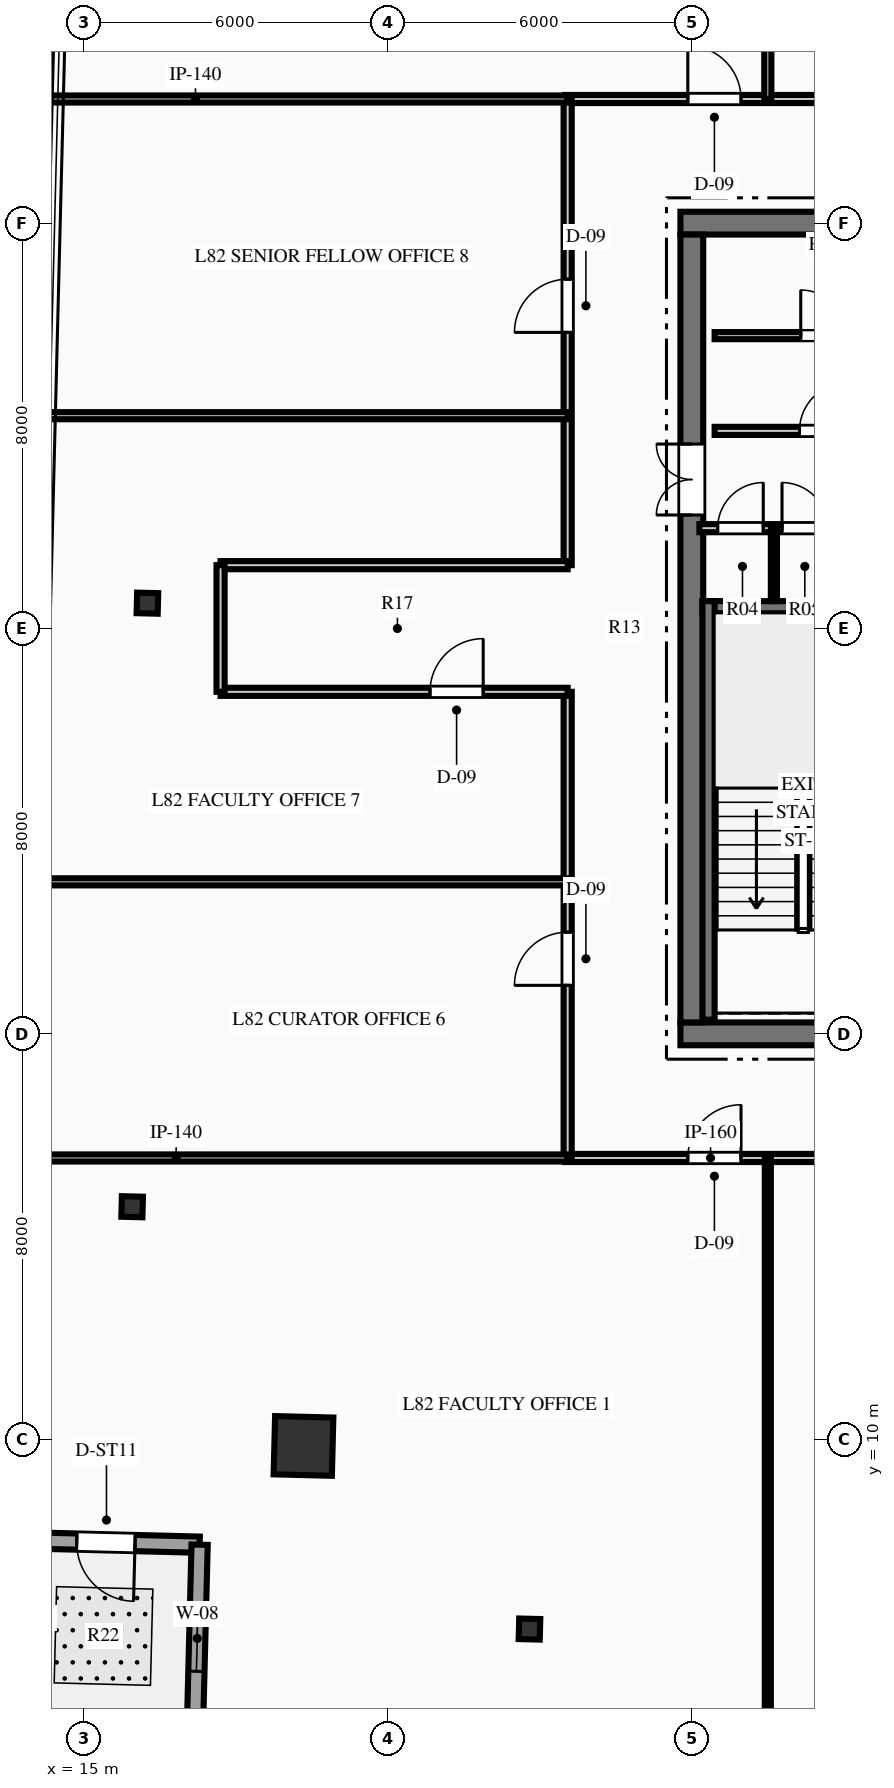
"""IFC4 building model, lengths in metres.
Left out: names, types, materials, properties, quantities, classifications, styles, units other than length and angle.
Written with IfcOpenShell. Run it as: python <this file> out.ifc"""

import sys

from ifc_helpers import new_model, si_unit, direction, frame, frame_2d, origin, origin_2d, place, context, subcontext, project, spatial, rectangle, hollow_rectangle, i_section, extrude, element, fill, save


model = new_model("IFC4")
c1 = context("Model", 3, precision=1e-05, world=origin(), true_north=direction((0.0, 1.0)))
c2 = subcontext(c1, "Body", "Model", "MODEL_VIEW")
j1 = project(units=[si_unit("LENGTHUNIT", "METRE"), si_unit("PLANEANGLEUNIT", "RADIAN")], contexts=[c1])
p1 = place(None, origin())
s1 = spatial("IfcSite", under=j1, at=p1, CompositionType="ELEMENT")
p2 = place(p1, origin())
s2 = spatial("IfcBuilding", under=s1, at=p2, CompositionType="ELEMENT")
p3 = place(p2, frame((0.0, 0.0, 325.2)))
s3 = spatial("IfcBuildingStorey", under=s2, at=p3, CompositionType="ELEMENT", Elevation=325.2)
p4 = place(p3, frame((26.775, 18.0, 0.0), z_axis=(0.0, 0.0, 1.0), x_axis=(1.0, 0.0, 0.0)))
e1 = element("IfcWall", 1, at=p4, inside=s3, PredefinedType="SHEAR", context=c2, shape_type="SweptSolid", body=[
    extrude(rectangle(XDim=18.45, YDim=0.45, at=frame_2d((9.225, 0.0))), origin(), (0.0, 0.0, 1.0), 3.75),
])
p5 = place(p4, frame((7.325, 0.0, 0.0)))
e2 = element("IfcOpeningElement", 2, at=p5, cuts=e1, PredefinedType="OPENING", context=c2, shape_type="SweptSolid", body=[
    extrude(rectangle(XDim=1.1, YDim=2.15, at=frame_2d((0.55, 1.075))), frame((0.0, 0.235, 0.0), z_axis=(0.0, -1.0, 0.0), x_axis=(1.0, 0.0, 0.0)), (0.0, 0.0, 1.0), 0.47),
])
p6 = place(p4, frame((10.025, 0.0, 0.0)))
e3 = element("IfcOpeningElement", 3, at=p6, cuts=e1, PredefinedType="OPENING", context=c2, shape_type="SweptSolid", body=[
    extrude(rectangle(XDim=1.1, YDim=2.15, at=frame_2d((0.55, 1.075))), frame((0.0, 0.235, 0.0), z_axis=(0.0, -1.0, 0.0), x_axis=(1.0, 0.0, 0.0)), (0.0, 0.0, 1.0), 0.47),
])
p7 = place(p3, frame((26.775, 34.0, 0.0), z_axis=(0.0, 0.0, 1.0), x_axis=(1.0, 0.0, 0.0)))
e4 = element("IfcWall", 4, at=p7, inside=s3, PredefinedType="SHEAR", context=c2, shape_type="SweptSolid", body=[
    extrude(rectangle(XDim=18.45, YDim=0.45, at=frame_2d((9.225, 0.0))), origin(), (0.0, 0.0, 1.0), 3.75),
])
p8 = place(p3, frame((27.0, 18.225, 0.0), z_axis=(0.0, 0.0, 1.0), x_axis=(0.0, 1.0, 0.0)))
e5 = element("IfcWall", 5, at=p8, inside=s3, PredefinedType="SHEAR", context=c2, shape_type="SweptSolid", body=[
    extrude(rectangle(XDim=15.55, YDim=0.45, at=frame_2d((7.775, 0.0))), origin(), (0.0, 0.0, 1.0), 3.75),
])
p9 = place(p8, frame((10.015, 0.0, 0.0)))
e6 = element("IfcOpeningElement", 6, at=p9, cuts=e5, PredefinedType="OPENING", context=c2, shape_type="SweptSolid", body=[
    extrude(rectangle(XDim=1.4, YDim=2.2, at=frame_2d((0.7, 1.1))), frame((0.0, 0.235, 0.0), z_axis=(0.0, -1.0, 0.0), x_axis=(1.0, 0.0, 0.0)), (0.0, 0.0, 1.0), 0.47),
])
p10 = place(p3, frame((27.21, 26.42, 0.0), z_axis=(0.0, 0.0, 1.0), x_axis=(1.0, 0.0, 0.0)))
e7 = element("IfcWall", 7, at=p10, inside=s3, PredefinedType="SHEAR", context=c2, shape_type="SweptSolid", body=[
    extrude(rectangle(XDim=3.98, YDim=0.24, at=frame_2d((1.99, 0.0))), origin(), (0.0, 0.0, 1.0), 3.75),
])
p11 = place(p3, frame((27.33, 18.28, 0.0), z_axis=(0.0, 0.0, 1.0), x_axis=(0.0, 1.0, 0.0)))
e8 = element("IfcWall", 8, at=p11, inside=s3, PredefinedType="SHEAR", context=c2, shape_type="SweptSolid", body=[
    extrude(rectangle(XDim=8.26, YDim=0.24, at=frame_2d((4.13, 0.0))), origin(), (0.0, 0.0, 1.0), 3.75),
])
p12 = place(p3, frame((19.336, 9.866, 0.0), z_axis=(0.0, 0.0, 1.0), x_axis=(0.025304572866, 0.999679788028, 0.0)))
e9 = element("IfcColumn", 9, at=p12, inside=s3, PredefinedType="COLUMN", context=c2, shape_type="SweptSolid", body=[
    extrude(hollow_rectangle(XDim=1.15, YDim=1.15, WallThickness=0.05, at=origin_2d()), origin(), (0.0, 0.0, 1.0), 3.75),
])
for number, where, z_axis, x_axis in (
    (10, (16.256, 26.5, 0.0), (0.0, 0.0, 1.0), (0.025, 1.0, 0.0)),
    (11, (15.955, 14.588, 0.0), (0.0, 0.0, 1.0), (0.025, 1.0, 0.0)),
    (12, (23.796, 6.252, 0.0), (0.0, 0.0, 1.0), (0.025, 1.0, 0.0)),
):
    element("IfcColumn", number, at=place(p3, frame(where, z_axis=z_axis, x_axis=x_axis)), inside=s3, PredefinedType="COLUMN", context=c2, shape_type="SweptSolid", body=[
        extrude(i_section(OverallWidth=0.406, OverallDepth=0.416, WebThickness=0.03, FlangeThickness=0.048, at=origin_2d()), origin(), (0.0, 0.0, 1.0), 3.75),
    ])
p13 = place(p3, frame((17.286, 7.918, 0.0), z_axis=(0.0, 0.0, 1.0), x_axis=(-0.999678931284, 0.025338396674, 0.0)))
e13 = element("IfcWall", 13, at=p13, inside=s3, PredefinedType="STANDARD", context=c2, shape_type="SweptSolid", body=[
    extrude(rectangle(XDim=3.7, YDim=0.32, at=frame_2d((1.85, 0.0))), origin(), (0.0, 0.0, 1.0), 3.49),
])
p14 = place(p13, frame((1.275, 0.0, 0.0)))
e14 = element("IfcOpeningElement", 14, at=p14, cuts=e13, PredefinedType="OPENING", context=c2, shape_type="SweptSolid", body=[
    extrude(rectangle(XDim=1.15, YDim=2.2, at=frame_2d((0.575, 1.1))), frame((0.0, 0.17, 0.0), z_axis=(0.0, -1.0, 0.0), x_axis=(1.0, 0.0, 0.0)), (0.0, 0.0, 1.0), 0.34),
])
p15 = place(p3, frame((17.193, 4.219, 0.0), z_axis=(0.0, 0.0, 1.0), x_axis=(0.025272453466, 0.99968060054, 0.0)))
e15 = element("IfcWall", 15, at=p15, inside=s3, PredefinedType="STANDARD", context=c2, shape_type="SweptSolid", body=[
    extrude(rectangle(XDim=3.7, YDim=0.32, at=frame_2d((1.85, 0.0))), origin(), (0.0, 0.0, 1.0), 3.49),
])
p16 = place(p15, frame((1.2, 0.0, 0.85)))
e16 = element("IfcOpeningElement", 16, at=p16, cuts=e15, PredefinedType="OPENING", context=c2, shape_type="SweptSolid", body=[
    extrude(rectangle(XDim=1.3, YDim=1.9, at=frame_2d((0.65, 0.95))), frame((0.0, 0.17, 0.0), z_axis=(0.0, -1.0, 0.0), x_axis=(1.0, 0.0, 0.0)), (0.0, 0.0, 1.0), 0.34),
])
p17 = place(p3, frame((27.15, 27.98, 0.0), z_axis=(0.0, 0.0, 1.0), x_axis=(1.0, 0.0, 0.0)))
e17 = element("IfcWall", 17, at=p17, inside=s3, PredefinedType="PARTITIONING", context=c2, shape_type="SweptSolid", body=[
    extrude(rectangle(XDim=4.05, YDim=0.16, at=frame_2d((2.025, 0.0))), origin(), (0.0, 0.0, 1.0), 3.49),
])
p18 = place(p17, frame((0.36, 0.0, 0.0)))
e18 = element("IfcOpeningElement", 18, at=p18, cuts=e17, PredefinedType="OPENING", context=c2, shape_type="SweptSolid", body=[
    extrude(rectangle(XDim=0.9, YDim=2.15, at=frame_2d((0.45, 1.075))), frame((0.0, 0.09, 0.0), z_axis=(0.0, -1.0, 0.0), x_axis=(1.0, 0.0, 0.0)), (0.0, 0.0, 1.0), 0.18),
])
p19 = place(p17, frame((1.63, 0.0, 0.0)))
e19 = element("IfcOpeningElement", 19, at=p19, cuts=e17, PredefinedType="OPENING", context=c2, shape_type="SweptSolid", body=[
    extrude(rectangle(XDim=0.9, YDim=2.15, at=frame_2d((0.45, 1.075))), frame((0.0, 0.09, 0.0), z_axis=(0.0, -1.0, 0.0), x_axis=(1.0, 0.0, 0.0)), (0.0, 0.0, 1.0), 0.18),
])
p20 = place(p17, frame((2.788, 0.0, 0.0)))
e20 = element("IfcOpeningElement", 20, at=p20, cuts=e17, PredefinedType="OPENING", context=c2, shape_type="SweptSolid", body=[
    extrude(rectangle(XDim=0.9, YDim=2.15, at=frame_2d((0.45, 1.075))), frame((0.0, 0.09, 0.0), z_axis=(0.0, -1.0, 0.0), x_axis=(1.0, 0.0, 0.0)), (0.0, 0.0, 1.0), 0.18),
])
p21 = place(p3, frame((28.62, 26.54, 0.0), z_axis=(0.0, 0.0, 1.0), x_axis=(0.0, 1.0, 0.0)))
e21 = element("IfcWall", 21, at=p21, inside=s3, PredefinedType="PARTITIONING", context=c2, shape_type="SweptSolid", body=[
    extrude(rectangle(XDim=1.44, YDim=0.12, at=frame_2d((0.72, 0.0))), origin(), (0.0, 0.0, 1.0), 3.49),
])
p22 = place(p3, frame((27.45, 29.9, 0.0), z_axis=(0.0, 0.0, 1.0), x_axis=(1.0, 0.0, 0.0)))
e22 = element("IfcWall", 22, at=p22, inside=s3, PredefinedType="PARTITIONING", context=c2, shape_type="SweptSolid", body=[
    extrude(rectangle(XDim=4.43, YDim=0.16, at=frame_2d((2.215, 0.0))), origin(), (0.0, 0.0, 1.0), 3.49),
])
p23 = place(p22, frame((1.675, 0.0, 0.0)))
e23 = element("IfcOpeningElement", 23, at=p23, cuts=e22, PredefinedType="OPENING", context=c2, shape_type="SweptSolid", body=[
    extrude(rectangle(XDim=0.95, YDim=2.15, at=frame_2d((0.475, 1.075))), frame((0.0, 0.09, 0.0), z_axis=(0.0, -1.0, 0.0), x_axis=(1.0, 0.0, 0.0)), (0.0, 0.0, 1.0), 0.18),
])
p24 = place(p3, frame((27.45, 31.78, 0.0), z_axis=(0.0, 0.0, 1.0), x_axis=(1.0, 0.0, 0.0)))
e24 = element("IfcWall", 24, at=p24, inside=s3, PredefinedType="PARTITIONING", context=c2, shape_type="SweptSolid", body=[
    extrude(rectangle(XDim=4.35, YDim=0.14, at=frame_2d((2.175, 0.0))), origin(), (0.0, 0.0, 1.0), 3.49),
])
p25 = place(p24, frame((1.7, 0.0, 0.0)))
e25 = element("IfcOpeningElement", 25, at=p25, cuts=e24, PredefinedType="OPENING", context=c2, shape_type="SweptSolid", body=[
    extrude(rectangle(XDim=0.9, YDim=2.15, at=frame_2d((0.45, 1.075))), frame((0.0, 0.08, 0.0), z_axis=(0.0, -1.0, 0.0), x_axis=(1.0, 0.0, 0.0)), (0.0, 0.0, 1.0), 0.16),
])
p26 = place(p3, frame((24.5, 15.55, 0.0), z_axis=(0.0, 0.0, 1.0), x_axis=(1.0, 0.0, 0.0)))
e26 = element("IfcWall", 26, at=p26, inside=s3, PredefinedType="PARTITIONING", context=c2, shape_type="SweptSolid", body=[
    extrude(rectangle(XDim=10.25, YDim=0.16, at=frame_2d((5.125, 0.0))), origin(), (0.0, 0.0, 1.0), 3.49),
])
p27 = place(p26, frame((2.421, 0.0, 0.0)))
e27 = element("IfcOpeningElement", 27, at=p27, cuts=e26, PredefinedType="OPENING", context=c2, shape_type="SweptSolid", body=[
    extrude(rectangle(XDim=1.05, YDim=2.15, at=frame_2d((0.525, 1.075))), frame((0.0, 0.09, 0.0), z_axis=(0.0, -1.0, 0.0), x_axis=(1.0, 0.0, 0.0)), (0.0, 0.0, 1.0), 0.18),
])
p28 = place(p26, frame((5.249, 0.0, 0.0)))
e28 = element("IfcOpeningElement", 28, at=p28, cuts=e26, PredefinedType="OPENING", context=c2, shape_type="SweptSolid", body=[
    extrude(rectangle(XDim=1.05, YDim=2.15, at=frame_2d((0.525, 1.075))), frame((0.0, 0.09, 0.0), z_axis=(0.0, -1.0, 0.0), x_axis=(1.0, 0.0, 0.0)), (0.0, 0.0, 1.0), 0.18),
])
p29 = place(p3, frame((24.5, 36.45, 0.0), z_axis=(0.0, 0.0, 1.0), x_axis=(1.0, 0.0, 0.0)))
e29 = element("IfcWall", 29, at=p29, inside=s3, PredefinedType="PARTITIONING", context=c2, shape_type="SweptSolid", body=[
    extrude(rectangle(XDim=10.25, YDim=0.16, at=frame_2d((5.125, 0.0))), origin(), (0.0, 0.0, 1.0), 3.49),
])
p30 = place(p29, frame((2.421, 0.0, 0.0)))
e30 = element("IfcOpeningElement", 30, at=p30, cuts=e29, PredefinedType="OPENING", context=c2, shape_type="SweptSolid", body=[
    extrude(rectangle(XDim=1.05, YDim=2.15, at=frame_2d((0.525, 1.075))), frame((0.0, 0.09, 0.0), z_axis=(0.0, -1.0, 0.0), x_axis=(1.0, 0.0, 0.0)), (0.0, 0.0, 1.0), 0.18),
])
p31 = place(p29, frame((5.249, 0.0, 0.0)))
e31 = element("IfcOpeningElement", 31, at=p31, cuts=e29, PredefinedType="OPENING", context=c2, shape_type="SweptSolid", body=[
    extrude(rectangle(XDim=1.05, YDim=2.15, at=frame_2d((0.525, 1.075))), frame((0.0, 0.09, 0.0), z_axis=(0.0, -1.0, 0.0), x_axis=(1.0, 0.0, 0.0)), (0.0, 0.0, 1.0), 0.18),
])
p32 = place(p3, frame((24.55, 15.55, 0.0), z_axis=(0.0, 0.0, 1.0), x_axis=(0.0, 1.0, 0.0)))
e32 = element("IfcWall", 32, at=p32, inside=s3, PredefinedType="PARTITIONING", context=c2, shape_type="SweptSolid", body=[
    extrude(rectangle(XDim=9.2, YDim=0.16, at=frame_2d((4.6, 0.0))), origin(), (0.0, 0.0, 1.0), 3.49),
])
p33 = place(p32, frame((3.407, 0.0, 0.0)))
e33 = element("IfcOpeningElement", 33, at=p33, cuts=e32, PredefinedType="OPENING", context=c2, shape_type="SweptSolid", body=[
    extrude(rectangle(XDim=1.05, YDim=2.15, at=frame_2d((0.525, 1.075))), frame((0.0, 0.09, 0.0), z_axis=(0.0, -1.0, 0.0), x_axis=(1.0, 0.0, 0.0)), (0.0, 0.0, 1.0), 0.18),
])
p34 = place(p3, frame((24.55, 27.25, 0.0), z_axis=(0.0, 0.0, 1.0), x_axis=(0.0, 1.0, 0.0)))
e34 = element("IfcWall", 34, at=p34, inside=s3, PredefinedType="PARTITIONING", context=c2, shape_type="SweptSolid", body=[
    extrude(rectangle(XDim=9.2, YDim=0.16, at=frame_2d((4.6, 0.0))), origin(), (0.0, 0.0, 1.0), 3.49),
])
p35 = place(p34, frame((4.594, 0.0, 0.0)))
e35 = element("IfcOpeningElement", 35, at=p35, cuts=e34, PredefinedType="OPENING", context=c2, shape_type="SweptSolid", body=[
    extrude(rectangle(XDim=1.05, YDim=2.15, at=frame_2d((0.525, 1.075))), frame((0.0, 0.09, 0.0), z_axis=(0.0, -1.0, 0.0), x_axis=(1.0, 0.0, 0.0)), (0.0, 0.0, 1.0), 0.18),
])
p36 = place(p3, frame((17.7, 24.75, 0.0), z_axis=(0.0, 0.0, 1.0), x_axis=(1.0, 0.0, 0.0)))
e36 = element("IfcWall", 36, at=p36, inside=s3, PredefinedType="PARTITIONING", context=c2, shape_type="SweptSolid", body=[
    extrude(rectangle(XDim=6.85, YDim=0.16, at=frame_2d((3.425, 0.0))), origin(), (0.0, 0.0, 1.0), 3.49),
])
p37 = place(p36, frame((4.133, 0.0, 0.0)))
e37 = element("IfcOpeningElement", 37, at=p37, cuts=e36, PredefinedType="OPENING", context=c2, shape_type="SweptSolid", body=[
    extrude(rectangle(XDim=1.05, YDim=2.15, at=frame_2d((0.525, 1.075))), frame((0.0, 0.09, 0.0), z_axis=(0.0, -1.0, 0.0), x_axis=(1.0, 0.0, 0.0)), (0.0, 0.0, 1.0), 0.18),
])
p38 = place(p3, frame((17.7, 27.25, 0.0), z_axis=(0.0, 0.0, 1.0), x_axis=(1.0, 0.0, 0.0)))
e38 = element("IfcWall", 38, at=p38, inside=s3, PredefinedType="PARTITIONING", context=c2, shape_type="SweptSolid", body=[
    extrude(rectangle(XDim=6.85, YDim=0.16, at=frame_2d((3.425, 0.0))), origin(), (0.0, 0.0, 1.0), 3.49),
])
p39 = place(p3, frame((17.7, 24.75, 0.0), z_axis=(0.0, 0.0, 1.0), x_axis=(0.0, 1.0, 0.0)))
e39 = element("IfcWall", 39, at=p39, inside=s3, PredefinedType="PARTITIONING", context=c2, shape_type="SweptSolid", body=[
    extrude(rectangle(XDim=2.5, YDim=0.16, at=frame_2d((1.25, 0.0))), origin(), (0.0, 0.0, 1.0), 3.49),
])
p40 = place(p3, frame((13.818, 15.55, 0.0), z_axis=(0.0, 0.0, 1.0), x_axis=(1.0, 0.0, 0.0)))
e40 = element("IfcWall", 40, at=p40, inside=s3, PredefinedType="PARTITIONING", context=c2, shape_type="SweptSolid", body=[
    extrude(rectangle(XDim=10.732, YDim=0.14, at=frame_2d((5.366, 0.0))), origin(), (0.0, 0.0, 1.0), 2.868),
])
p41 = place(p3, frame((14.347, 36.45, 0.0), z_axis=(0.0, 0.0, 1.0), x_axis=(1.0, 0.0, 0.0)))
e41 = element("IfcWall", 41, at=p41, inside=s3, PredefinedType="PARTITIONING", context=c2, shape_type="SweptSolid", body=[
    extrude(rectangle(XDim=10.203, YDim=0.14, at=frame_2d((5.101, 0.0))), origin(), (0.0, 0.0, 1.0), 2.868),
])
p42 = place(p3, frame((28.5, 3.973, 0.0), z_axis=(0.0, 0.0, 1.0), x_axis=(0.0, 1.0, 0.0)))
e42 = element("IfcWall", 42, at=p42, inside=s3, PredefinedType="PARTITIONING", context=c2, shape_type="SweptSolid", body=[
    extrude(rectangle(XDim=11.577, YDim=0.12, at=frame_2d((5.789, 0.0))), origin(), (0.0, 0.0, 1.0), 3.49),
])
p43 = place(p3, frame((28.5, 36.45, 0.0), z_axis=(0.0, 0.0, 1.0), x_axis=(0.0, 1.0, 0.0)))
e43 = element("IfcWall", 43, at=p43, inside=s3, PredefinedType="PARTITIONING", context=c2, shape_type="SweptSolid", body=[
    extrude(rectangle(XDim=11.957, YDim=0.14, at=frame_2d((5.979, 0.0))), origin(), (0.0, 0.0, 1.0), 3.49),
])
p44 = place(p3, frame((13.956, 21.0, 0.0), z_axis=(0.0, 0.0, 1.0), x_axis=(1.0, 0.0, 0.0)))
e44 = element("IfcWall", 44, at=p44, inside=s3, PredefinedType="PARTITIONING", context=c2, shape_type="SweptSolid", body=[
    extrude(rectangle(XDim=10.594, YDim=0.14, at=frame_2d((5.297, 0.0))), origin(), (0.0, 0.0, 1.0), 3.49),
])
p45 = place(p3, frame((14.189, 30.2, 0.0), z_axis=(0.0, 0.0, 1.0), x_axis=(1.0, 0.0, 0.0)))
e45 = element("IfcWall", 45, at=p45, inside=s3, PredefinedType="PARTITIONING", context=c2, shape_type="SweptSolid", body=[
    extrude(rectangle(XDim=10.361, YDim=0.14, at=frame_2d((5.18, 0.0))), origin(), (0.0, 0.0, 1.0), 3.49),
])
p46 = place(p14, origin())
e46 = element("IfcDoor", 46, at=p46, inside=s3, OperationType="SINGLE_SWING_LEFT", PredefinedType="DOOR", context=c2, shape_type="SweptSolid", body=[
    extrude(rectangle(XDim=1.15, YDim=2.2, at=frame_2d((0.575, 1.1))), frame((0.0, 0.025, 0.0), z_axis=(0.0, -1.0, 0.0), x_axis=(1.0, 0.0, 0.0)), (0.0, 0.0, 1.0), 0.05),
])
fill(e14, e46)
p47 = place(p16, origin())
e47 = element("IfcWindow", 47, at=p47, inside=s3, PartitioningType="SINGLE_PANEL", PredefinedType="WINDOW", context=c2, shape_type="SweptSolid", body=[
    extrude(rectangle(XDim=1.3, YDim=1.9, at=frame_2d((0.65, 0.95))), frame((0.0, 0.03, 0.0), z_axis=(0.0, -1.0, 0.0), x_axis=(1.0, 0.0, 0.0)), (0.0, 0.0, 1.0), 0.06),
])
fill(e16, e47)
p48 = place(p18, origin())
e48 = element("IfcDoor", 48, at=p48, inside=s3, OperationType="SINGLE_SWING_RIGHT", PredefinedType="DOOR", context=c2, shape_type="SweptSolid", body=[
    extrude(rectangle(XDim=0.9, YDim=2.15, at=frame_2d((0.45, 1.075))), frame((0.0, 0.025, 0.0), z_axis=(0.0, -1.0, 0.0), x_axis=(1.0, 0.0, 0.0)), (0.0, 0.0, 1.0), 0.05),
])
fill(e18, e48)
p49 = place(p19, origin())
e49 = element("IfcDoor", 49, at=p49, inside=s3, OperationType="SINGLE_SWING_LEFT", PredefinedType="DOOR", context=c2, shape_type="SweptSolid", body=[
    extrude(rectangle(XDim=0.9, YDim=2.15, at=frame_2d((0.45, 1.075))), frame((0.0, 0.025, 0.0), z_axis=(0.0, -1.0, 0.0), x_axis=(1.0, 0.0, 0.0)), (0.0, 0.0, 1.0), 0.05),
])
fill(e19, e49)
p50 = place(p23, origin())
e50 = element("IfcDoor", 50, at=p50, inside=s3, OperationType="SINGLE_SWING_RIGHT", PredefinedType="DOOR", context=c2, shape_type="SweptSolid", body=[
    extrude(rectangle(XDim=0.95, YDim=2.15, at=frame_2d((0.475, 1.075))), frame((0.0, 0.025, 0.0), z_axis=(0.0, -1.0, 0.0), x_axis=(1.0, 0.0, 0.0)), (0.0, 0.0, 1.0), 0.05),
])
fill(e23, e50)
p51 = place(p25, origin())
e51 = element("IfcDoor", 51, at=p51, inside=s3, OperationType="SINGLE_SWING_LEFT", PredefinedType="DOOR", context=c2, shape_type="SweptSolid", body=[
    extrude(rectangle(XDim=0.9, YDim=2.15, at=frame_2d((0.45, 1.075))), frame((0.0, 0.025, 0.0), z_axis=(0.0, -1.0, 0.0), x_axis=(1.0, 0.0, 0.0)), (0.0, 0.0, 1.0), 0.05),
])
fill(e25, e51)
p52 = place(p9, origin())
e52 = element("IfcDoor", 52, at=p52, inside=s3, OperationType="DOUBLE_DOOR_SINGLE_SWING", PredefinedType="DOOR", context=c2, shape_type="SweptSolid", body=[
    extrude(rectangle(XDim=1.4, YDim=2.2, at=frame_2d((0.7, 1.1))), frame((0.0, 0.025, 0.0), z_axis=(0.0, -1.0, 0.0), x_axis=(1.0, 0.0, 0.0)), (0.0, 0.0, 1.0), 0.05),
])
fill(e6, e52)
p53 = place(p27, origin())
e53 = element("IfcDoor", 53, at=p53, inside=s3, OperationType="SINGLE_SWING_RIGHT", PredefinedType="DOOR", context=c2, shape_type="SweptSolid", body=[
    extrude(rectangle(XDim=1.05, YDim=2.15, at=frame_2d((0.525, 1.075))), frame((0.0, 0.025, 0.0), z_axis=(0.0, -1.0, 0.0), x_axis=(1.0, 0.0, 0.0)), (0.0, 0.0, 1.0), 0.05),
])
fill(e27, e53)
p54 = place(p30, origin())
e54 = element("IfcDoor", 54, at=p54, inside=s3, OperationType="SINGLE_SWING_LEFT", PredefinedType="DOOR", context=c2, shape_type="SweptSolid", body=[
    extrude(rectangle(XDim=1.05, YDim=2.15, at=frame_2d((0.525, 1.075))), frame((0.0, 0.025, 0.0), z_axis=(0.0, -1.0, 0.0), x_axis=(1.0, 0.0, 0.0)), (0.0, 0.0, 1.0), 0.05),
])
fill(e30, e54)
p55 = place(p33, origin())
e55 = element("IfcDoor", 55, at=p55, inside=s3, OperationType="SINGLE_SWING_LEFT", PredefinedType="DOOR", context=c2, shape_type="SweptSolid", body=[
    extrude(rectangle(XDim=1.05, YDim=2.15, at=frame_2d((0.525, 1.075))), frame((0.0, 0.025, 0.0), z_axis=(0.0, -1.0, 0.0), x_axis=(1.0, 0.0, 0.0)), (0.0, 0.0, 1.0), 0.05),
])
fill(e33, e55)
p56 = place(p37, origin())
e56 = element("IfcDoor", 56, at=p56, inside=s3, OperationType="SINGLE_SWING_RIGHT", PredefinedType="DOOR", context=c2, shape_type="SweptSolid", body=[
    extrude(rectangle(XDim=1.05, YDim=2.15, at=frame_2d((0.525, 1.075))), frame((0.0, 0.025, 0.0), z_axis=(0.0, -1.0, 0.0), x_axis=(1.0, 0.0, 0.0)), (0.0, 0.0, 1.0), 0.05),
])
fill(e37, e56)
p57 = place(p35, origin())
e57 = element("IfcDoor", 57, at=p57, inside=s3, OperationType="SINGLE_SWING_LEFT", PredefinedType="DOOR", context=c2, shape_type="SweptSolid", body=[
    extrude(rectangle(XDim=1.05, YDim=2.15, at=frame_2d((0.525, 1.075))), frame((0.0, 0.025, 0.0), z_axis=(0.0, -1.0, 0.0), x_axis=(1.0, 0.0, 0.0)), (0.0, 0.0, 1.0), 0.05),
])
fill(e35, e57)
save(model, sys.argv[1])
